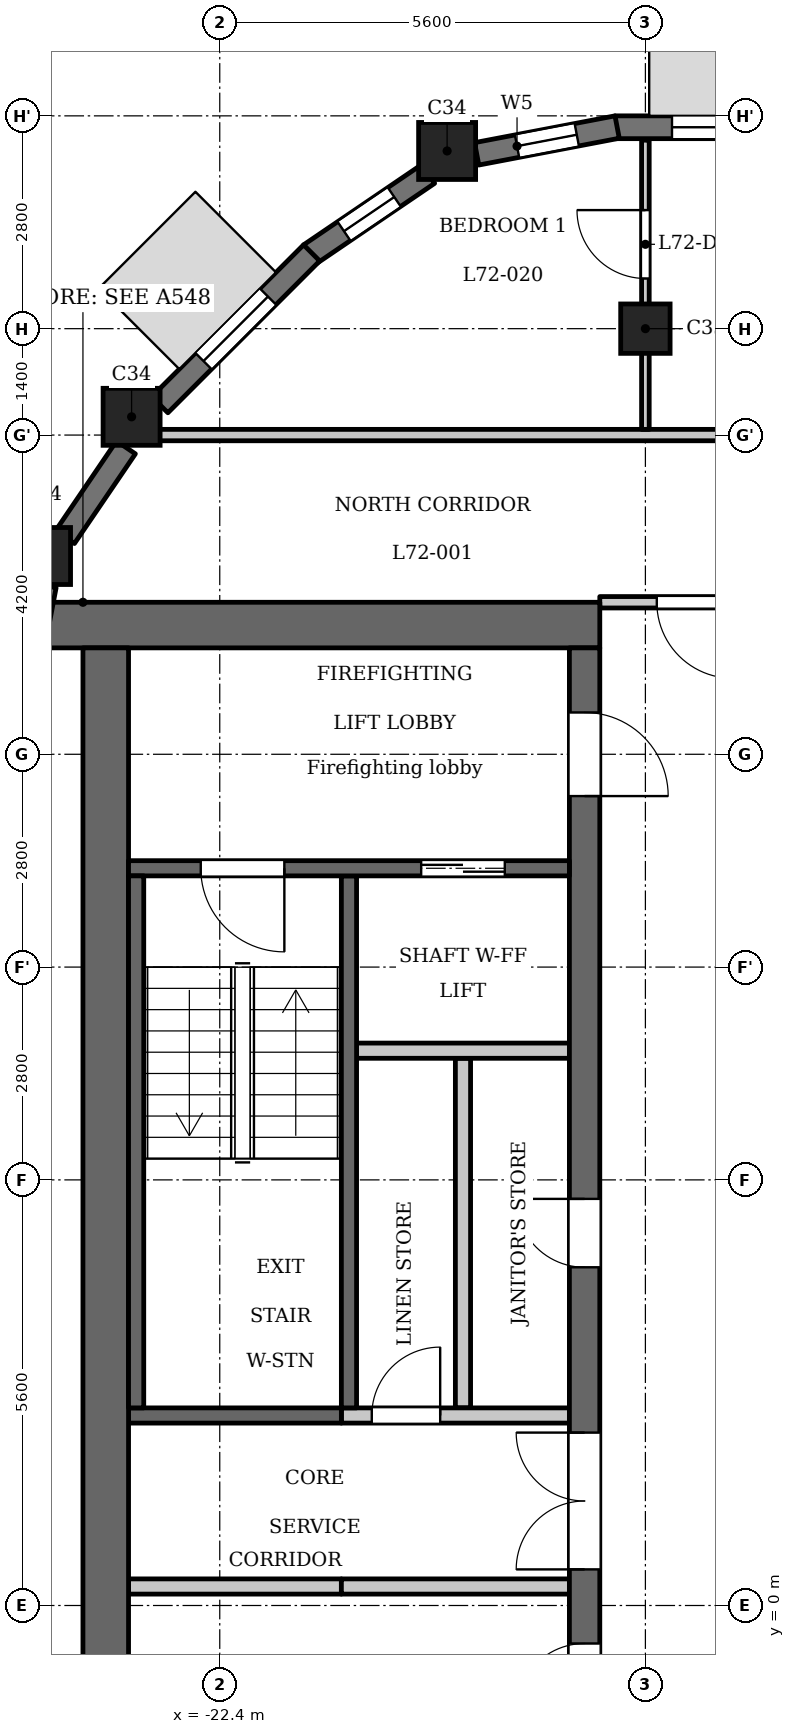
"""IFC4 building model, lengths in metres.
Left out: names, types, materials, properties, quantities, classifications, styles, units other than length and angle.
Written with IfcOpenShell. Run it as: python <this file> out.ifc"""

import sys

from ifc_helpers import new_model, si_unit, direction, frame, frame_2d, origin, origin_2d, place, context, subcontext, project, spatial, rectangle, extrude, element, fill, save


model = new_model("IFC4")
c1 = context("Model", 3, precision=1e-05, world=origin(), true_north=direction((0.0, 1.0)))
c2 = subcontext(c1, "Body", "Model", "MODEL_VIEW")
j1 = project(units=[si_unit("LENGTHUNIT", "METRE"), si_unit("PLANEANGLEUNIT", "RADIAN")], contexts=[c1])
p1 = place(None, origin())
s1 = spatial("IfcSite", under=j1, at=p1, CompositionType="ELEMENT")
p2 = place(p1, origin())
s2 = spatial("IfcBuilding", under=s1, at=p2, CompositionType="ELEMENT")
p3 = place(p2, frame((0.0, 0.0, 276.7)))
s3 = spatial("IfcBuildingStorey", under=s2, at=p3, CompositionType="ELEMENT", Elevation=276.7)
for number, where, z_axis, x_axis in (
    (1, (-19.409, 19.138, 0.0), (0.0, 0.0, 1.0), (1.0, 0.0, 0.0)),
    (2, (-23.56, 15.64, 0.0), (0.0, 0.0, 1.0), (1.0, 0.0, 0.0)),
    (3, (-24.738, 13.809, 0.0), (0.0, 0.0, 1.0), (1.0, 0.0, 0.0)),
):
    element("IfcColumn", number, at=place(p3, frame(where, z_axis=z_axis, x_axis=x_axis)), inside=s3, PredefinedType="COLUMN", context=c2, shape_type="SweptSolid", body=[
        extrude(rectangle(XDim=0.75, YDim=0.75, at=origin_2d()), origin(), (0.0, 0.0, 1.0), 3.5),
    ])
p4 = place(p3, frame((-16.8, 16.8, 0.0), z_axis=(0.0, 0.0, 1.0), x_axis=(1.0, 0.0, 0.0)))
e4 = element("IfcColumn", 4, at=p4, inside=s3, PredefinedType="COLUMN", context=c2, shape_type="SweptSolid", body=[
    extrude(rectangle(XDim=0.65, YDim=0.65, at=origin_2d()), origin(), (0.0, 0.0, 1.0), 3.5),
])
p5 = place(p3, frame((-14.375, 19.45, 0.0), z_axis=(0.0, 0.0, 1.0), x_axis=(-1.0, 0.0, 0.0)))
e5 = element("IfcWall", 5, at=p5, inside=s3, PredefinedType="SOLIDWALL", context=c2, shape_type="SweptSolid", body=[
    extrude(rectangle(XDim=2.825, YDim=0.3, at=frame_2d((1.413, 0.0))), origin(), (0.0, 0.0, 1.0), 2.55),
])
p6 = place(p5, frame((0.275, 0.0, 0.9)))
e6 = element("IfcOpeningElement", 6, at=p6, cuts=e5, PredefinedType="OPENING", context=c2, shape_type="SweptSolid", body=[
    extrude(rectangle(XDim=1.8, YDim=1.25, at=frame_2d((0.9, 0.625))), frame((0.0, 0.16, 0.0), z_axis=(0.0, -1.0, 0.0), x_axis=(1.0, 0.0, 0.0)), (0.0, 0.0, 1.0), 0.32),
])
p7 = place(p3, frame((-17.172, 19.453, 0.0), z_axis=(0.0, 0.0, 1.0), x_axis=(-0.982284001233, -0.187398348234, 0.0)))
e7 = element("IfcWall", 7, at=p7, inside=s3, PredefinedType="SOLIDWALL", context=c2, shape_type="SweptSolid", body=[
    extrude(rectangle(XDim=1.881, YDim=0.3, at=frame_2d((0.941, 0.0))), origin(), (0.0, 0.0, 1.0), 2.55),
])
p8 = place(p7, frame((0.541, 0.0, 0.6)))
e8 = element("IfcOpeningElement", 8, at=p8, cuts=e7, PredefinedType="OPENING", context=c2, shape_type="SweptSolid", body=[
    extrude(rectangle(XDim=0.8, YDim=1.55, at=frame_2d((0.4, 0.775))), frame((0.0, 0.16, 0.0), z_axis=(0.0, -1.0, 0.0), x_axis=(1.0, 0.0, 0.0)), (0.0, 0.0, 1.0), 0.32),
])
p9 = place(p3, frame((-19.657, 18.836, 0.0), z_axis=(0.0, 0.0, 1.0), x_axis=(-0.82704477487, -0.562136051469, 0.0)))
e9 = element("IfcWall", 9, at=p9, inside=s3, PredefinedType="SOLIDWALL", context=c2, shape_type="SweptSolid", body=[
    extrude(rectangle(XDim=1.881, YDim=0.3, at=frame_2d((0.94, 0.0))), origin(), (0.0, 0.0, 1.0), 2.55),
])
p10 = place(p9, frame((0.541, 0.0, 0.6)))
e10 = element("IfcOpeningElement", 10, at=p10, cuts=e9, PredefinedType="OPENING", context=c2, shape_type="SweptSolid", body=[
    extrude(rectangle(XDim=0.8, YDim=1.55, at=frame_2d((0.4, 0.775))), frame((0.0, 0.16, 0.0), z_axis=(0.0, -1.0, 0.0), x_axis=(1.0, 0.0, 0.0)), (0.0, 0.0, 1.0), 0.32),
])
p11 = place(p3, frame((-21.191, 17.797, 0.0), z_axis=(0.0, 0.0, 1.0), x_axis=(-0.707106781187, -0.707106781187, 0.0)))
e11 = element("IfcWall", 11, at=p11, inside=s3, PredefinedType="SOLIDWALL", context=c2, shape_type="SweptSolid", body=[
    extrude(rectangle(XDim=2.825, YDim=0.3, at=frame_2d((1.413, 0.0))), origin(), (0.0, 0.0, 1.0), 2.55),
])
p12 = place(p11, frame((0.812, 0.0, 0.6)))
e12 = element("IfcOpeningElement", 12, at=p12, cuts=e11, PredefinedType="OPENING", context=c2, shape_type="SweptSolid", body=[
    extrude(rectangle(XDim=1.2, YDim=1.55, at=frame_2d((0.6, 0.775))), frame((0.0, 0.16, 0.0), z_axis=(0.0, -1.0, 0.0), x_axis=(1.0, 0.0, 0.0)), (0.0, 0.0, 1.0), 0.32),
])
p13 = place(p3, frame((-23.634, 15.237, 0.0), z_axis=(0.0, 0.0, 1.0), x_axis=(-0.562099454787, -0.827069648173, 0.0)))
e13 = element("IfcWall", 13, at=p13, inside=s3, PredefinedType="SOLIDWALL", context=c2, shape_type="SweptSolid", body=[
    extrude(rectangle(XDim=1.427, YDim=0.3, at=frame_2d((0.714, 0.0))), origin(), (0.0, 0.0, 1.0), 2.55),
])
p14 = place(p3, frame((-24.7, 13.42, 0.0), z_axis=(0.0, 0.0, 1.0), x_axis=(-0.187398348234, -0.982284001233, 0.0)))
e14 = element("IfcWall", 14, at=p14, inside=s3, PredefinedType="SOLIDWALL", context=c2, shape_type="SweptSolid", body=[
    extrude(rectangle(XDim=1.881, YDim=0.3, at=frame_2d((0.941, 0.0))), origin(), (0.0, 0.0, 1.0), 2.55),
])
p15 = place(p3, frame((-20.7, 2.6, 0.0), z_axis=(0.0, 0.0, 1.0), x_axis=(0.0, 1.0, 0.0)))
e15 = element("IfcWall", 15, at=p15, inside=s3, PredefinedType="SHEAR", context=c2, shape_type="SweptSolid", body=[
    extrude(rectangle(XDim=7.0, YDim=0.2, at=frame_2d((3.5, 0.0))), origin(), (0.0, 0.0, 1.0), 3.2),
])
p16 = place(p3, frame((-20.8, 2.5, 0.0), z_axis=(0.0, 0.0, 1.0), x_axis=(-1.0, 0.0, 0.0)))
e16 = element("IfcWall", 16, at=p16, inside=s3, PredefinedType="SHEAR", context=c2, shape_type="SweptSolid", body=[
    extrude(rectangle(XDim=2.8, YDim=0.2, at=frame_2d((1.4, 0.0))), origin(), (0.0, 0.0, 1.0), 3.2),
])
p17 = place(p3, frame((-20.8, 0.25, 0.0), z_axis=(0.0, 0.0, 1.0), x_axis=(-1.0, 0.0, 0.0)))
e17 = element("IfcWall", 17, at=p17, inside=s3, PredefinedType="PARTITIONING", context=c2, shape_type="SweptSolid", body=[
    extrude(rectangle(XDim=2.8, YDim=0.2, at=frame_2d((1.4, 0.0))), origin(), (0.0, 0.0, 1.0), 3.2),
])
p18 = place(p3, frame((-17.4, 12.9, 0.0), z_axis=(0.0, 0.0, 1.0), x_axis=(-1.0, 0.0, 0.0)))
e18 = element("IfcWall", 18, at=p18, inside=s3, PredefinedType="SHEAR", context=c2, shape_type="SweptSolid", body=[
    extrude(rectangle(XDim=7.32, YDim=0.6, at=frame_2d((3.66, 0.0))), origin(), (0.0, 0.0, 1.0), 3.2),
])
p19 = place(p3, frame((-19.2, 2.6, 0.0), z_axis=(0.0, 0.0, 1.0), x_axis=(0.0, 1.0, 0.0)))
e19 = element("IfcWall", 19, at=p19, inside=s3, PredefinedType="PARTITIONING", context=c2, shape_type="SweptSolid", body=[
    extrude(rectangle(XDim=4.6, YDim=0.2, at=frame_2d((2.3, 0.0))), origin(), (0.0, 0.0, 1.0), 3.2),
])
p20 = place(p3, frame((-17.6, -12.6, 0.0), z_axis=(0.0, 0.0, 1.0), x_axis=(0.0, 1.0, 0.0)))
e20 = element("IfcWall", 20, at=p20, inside=s3, PredefinedType="SHEAR", context=c2, shape_type="SweptSolid", body=[
    extrude(rectangle(XDim=25.2, YDim=0.4, at=frame_2d((12.6, 0.0))), origin(), (0.0, 0.0, 1.0), 3.2),
])
p21 = place(p20, frame((6.3, 0.0, 0.0)))
e21 = element("IfcOpeningElement", 21, at=p21, cuts=e20, PredefinedType="OPENING", context=c2, shape_type="SweptSolid", body=[
    extrude(rectangle(XDim=1.1, YDim=2.1, at=frame_2d((0.55, 1.05))), frame((0.0, 0.21, 0.0), z_axis=(0.0, -1.0, 0.0), x_axis=(1.0, 0.0, 0.0)), (0.0, 0.0, 1.0), 0.42),
])
p22 = place(p20, frame((8.7, 0.0, 0.0)))
e22 = element("IfcOpeningElement", 22, at=p22, cuts=e20, PredefinedType="OPENING", context=c2, shape_type="SweptSolid", body=[
    extrude(rectangle(XDim=1.1, YDim=2.1, at=frame_2d((0.55, 1.05))), frame((0.0, 0.21, 0.0), z_axis=(0.0, -1.0, 0.0), x_axis=(1.0, 0.0, 0.0)), (0.0, 0.0, 1.0), 0.42),
])
p23 = place(p20, frame((11.2, 0.0, 0.0)))
e23 = element("IfcOpeningElement", 23, at=p23, cuts=e20, PredefinedType="OPENING", context=c2, shape_type="SweptSolid", body=[
    extrude(rectangle(XDim=0.9, YDim=2.1, at=frame_2d((0.45, 1.05))), frame((0.0, 0.21, 0.0), z_axis=(0.0, -1.0, 0.0), x_axis=(1.0, 0.0, 0.0)), (0.0, 0.0, 1.0), 0.42),
])
p24 = place(p20, frame((17.05, 0.0, 0.0)))
e24 = element("IfcOpeningElement", 24, at=p24, cuts=e20, PredefinedType="OPENING", context=c2, shape_type="SweptSolid", body=[
    extrude(rectangle(XDim=0.9, YDim=2.1, at=frame_2d((0.45, 1.05))), frame((0.0, 0.21, 0.0), z_axis=(0.0, -1.0, 0.0), x_axis=(1.0, 0.0, 0.0)), (0.0, 0.0, 1.0), 0.42),
])
p25 = place(p20, frame((23.25, 0.0, 0.0)))
e25 = element("IfcOpeningElement", 25, at=p25, cuts=e20, PredefinedType="OPENING", context=c2, shape_type="SweptSolid", body=[
    extrude(rectangle(XDim=1.1, YDim=2.1, at=frame_2d((0.55, 1.05))), frame((0.0, 0.21, 0.0), z_axis=(0.0, -1.0, 0.0), x_axis=(1.0, 0.0, 0.0)), (0.0, 0.0, 1.0), 0.42),
])
p26 = place(p20, frame((0.85, 0.0, 0.0)))
e26 = element("IfcOpeningElement", 26, at=p26, cuts=e20, PredefinedType="OPENING", context=c2, shape_type="SweptSolid", body=[
    extrude(rectangle(XDim=1.1, YDim=2.1, at=frame_2d((0.55, 1.05))), frame((0.0, 0.21, 0.0), z_axis=(0.0, -1.0, 0.0), x_axis=(1.0, 0.0, 0.0)), (0.0, 0.0, 1.0), 0.42),
])
p27 = place(p20, frame((13.075, 0.0, 0.0)))
e27 = element("IfcOpeningElement", 27, at=p27, cuts=e20, PredefinedType="OPENING", context=c2, shape_type="SweptSolid", body=[
    extrude(rectangle(XDim=1.8, YDim=2.1, at=frame_2d((0.9, 1.05))), frame((0.0, 0.21, 0.0), z_axis=(0.0, -1.0, 0.0), x_axis=(1.0, 0.0, 0.0)), (0.0, 0.0, 1.0), 0.42),
])
p28 = place(p3, frame((-23.9, -12.6, 0.0), z_axis=(0.0, 0.0, 1.0), x_axis=(0.0, 1.0, 0.0)))
e28 = element("IfcWall", 28, at=p28, inside=s3, PredefinedType="SHEAR", context=c2, shape_type="SweptSolid", body=[
    extrude(rectangle(XDim=25.2, YDim=0.6, at=frame_2d((12.6, 0.0))), origin(), (0.0, 0.0, 1.0), 3.2),
])
p29 = place(p3, frame((-17.8, 0.25, 0.0), z_axis=(0.0, 0.0, 1.0), x_axis=(-1.0, 0.0, 0.0)))
e29 = element("IfcWall", 29, at=p29, inside=s3, PredefinedType="PARTITIONING", context=c2, shape_type="SweptSolid", body=[
    extrude(rectangle(XDim=3.0, YDim=0.2, at=frame_2d((1.5, 0.0))), origin(), (0.0, 0.0, 1.0), 3.2),
])
p30 = place(p3, frame((-17.8, 2.5, 0.0), z_axis=(0.0, 0.0, 1.0), x_axis=(-1.0, 0.0, 0.0)))
e30 = element("IfcWall", 30, at=p30, inside=s3, PredefinedType="PARTITIONING", context=c2, shape_type="SweptSolid", body=[
    extrude(rectangle(XDim=3.0, YDim=0.2, at=frame_2d((1.5, 0.0))), origin(), (0.0, 0.0, 1.0), 3.2),
])
p31 = place(p30, frame((1.7, 0.0, 0.0)))
e31 = element("IfcOpeningElement", 31, at=p31, cuts=e30, PredefinedType="OPENING", context=c2, shape_type="SweptSolid", body=[
    extrude(rectangle(XDim=0.9, YDim=2.1, at=frame_2d((0.45, 1.05))), frame((0.0, 0.11, 0.0), z_axis=(0.0, -1.0, 0.0), x_axis=(1.0, 0.0, 0.0)), (0.0, 0.0, 1.0), 0.22),
])
p32 = place(p3, frame((-17.8, 7.3, 0.0), z_axis=(0.0, 0.0, 1.0), x_axis=(-1.0, 0.0, 0.0)))
e32 = element("IfcWall", 32, at=p32, inside=s3, PredefinedType="PARTITIONING", context=c2, shape_type="SweptSolid", body=[
    extrude(rectangle(XDim=2.8, YDim=0.2, at=frame_2d((1.4, 0.0))), origin(), (0.0, 0.0, 1.0), 3.2),
])
p33 = place(p3, frame((-17.8, 9.7, 0.0), z_axis=(0.0, 0.0, 1.0), x_axis=(-1.0, 0.0, 0.0)))
e33 = element("IfcWall", 33, at=p33, inside=s3, PredefinedType="SHEAR", context=c2, shape_type="SweptSolid", body=[
    extrude(rectangle(XDim=5.8, YDim=0.2, at=frame_2d((2.9, 0.0))), origin(), (0.0, 0.0, 1.0), 3.2),
])
p34 = place(p33, frame((0.85, 0.0, 0.0)))
e34 = element("IfcOpeningElement", 34, at=p34, cuts=e33, PredefinedType="OPENING", context=c2, shape_type="SweptSolid", body=[
    extrude(rectangle(XDim=1.1, YDim=2.1, at=frame_2d((0.55, 1.05))), frame((0.0, 0.11, 0.0), z_axis=(0.0, -1.0, 0.0), x_axis=(1.0, 0.0, 0.0)), (0.0, 0.0, 1.0), 0.22),
])
p35 = place(p33, frame((3.75, 0.0, 0.0)))
e35 = element("IfcOpeningElement", 35, at=p35, cuts=e33, PredefinedType="OPENING", context=c2, shape_type="SweptSolid", body=[
    extrude(rectangle(XDim=1.1, YDim=2.1, at=frame_2d((0.55, 1.05))), frame((0.0, 0.11, 0.0), z_axis=(0.0, -1.0, 0.0), x_axis=(1.0, 0.0, 0.0)), (0.0, 0.0, 1.0), 0.22),
])
p36 = place(p3, frame((-23.5, 2.6, 0.0), z_axis=(0.0, 0.0, 1.0), x_axis=(0.0, 1.0, 0.0)))
e36 = element("IfcWall", 36, at=p36, inside=s3, PredefinedType="SHEAR", context=c2, shape_type="SweptSolid", body=[
    extrude(rectangle(XDim=7.0, YDim=0.2, at=frame_2d((3.5, 0.0))), origin(), (0.0, 0.0, 1.0), 3.2),
])
p37 = place(p3, frame((-17.4, 13.2, 0.0), z_axis=(0.0, 0.0, 1.0), x_axis=(1.0, 0.0, 0.0)))
e37 = element("IfcWall", 37, at=p37, inside=s3, PredefinedType="PARTITIONING", context=c2, shape_type="SweptSolid", body=[
    extrude(rectangle(XDim=2.325, YDim=0.15, at=frame_2d((1.163, 0.0))), origin(), (0.0, 0.0, 1.0), 3.2),
])
p38 = place(p37, frame((0.75, 0.0, 0.0)))
e38 = element("IfcOpeningElement", 38, at=p38, cuts=e37, PredefinedType="OPENING", context=c2, shape_type="SweptSolid", body=[
    extrude(rectangle(XDim=1.0, YDim=2.1, at=frame_2d((0.5, 1.05))), frame((0.0, 0.085, 0.0), z_axis=(0.0, -1.0, 0.0), x_axis=(1.0, 0.0, 0.0)), (0.0, 0.0, 1.0), 0.17),
])
p39 = place(p3, frame((-23.55, 15.4, 0.0), z_axis=(0.0, 0.0, 1.0), x_axis=(1.0, 0.0, 0.0)))
e39 = element("IfcWall", 39, at=p39, inside=s3, PredefinedType="PARTITIONING", context=c2, shape_type="SweptSolid", body=[
    extrude(rectangle(XDim=46.872, YDim=0.15, at=frame_2d((23.436, 0.0))), origin(), (0.0, 0.0, 1.0), 3.2),
])
p40 = place(p39, frame((13.9, 0.0, 0.0)))
e40 = element("IfcOpeningElement", 40, at=p40, cuts=e39, PredefinedType="OPENING", context=c2, shape_type="SweptSolid", body=[
    extrude(rectangle(XDim=1.0, YDim=2.1, at=frame_2d((0.5, 1.05))), frame((0.0, 0.085, 0.0), z_axis=(0.0, -1.0, 0.0), x_axis=(1.0, 0.0, 0.0)), (0.0, 0.0, 1.0), 0.17),
])
p41 = place(p39, frame((21.9, 0.0, 0.0)))
e41 = element("IfcOpeningElement", 41, at=p41, cuts=e39, PredefinedType="OPENING", context=c2, shape_type="SweptSolid", body=[
    extrude(rectangle(XDim=1.0, YDim=2.1, at=frame_2d((0.5, 1.05))), frame((0.0, 0.085, 0.0), z_axis=(0.0, -1.0, 0.0), x_axis=(1.0, 0.0, 0.0)), (0.0, 0.0, 1.0), 0.17),
])
p42 = place(p39, frame((38.7, 0.0, 0.0)))
e42 = element("IfcOpeningElement", 42, at=p42, cuts=e39, PredefinedType="OPENING", context=c2, shape_type="SweptSolid", body=[
    extrude(rectangle(XDim=1.0, YDim=2.1, at=frame_2d((0.5, 1.05))), frame((0.0, 0.085, 0.0), z_axis=(0.0, -1.0, 0.0), x_axis=(1.0, 0.0, 0.0)), (0.0, 0.0, 1.0), 0.17),
])
p43 = place(p3, frame((-16.8, 15.475, 0.0), z_axis=(0.0, 0.0, 1.0), x_axis=(0.0, 1.0, 0.0)))
e43 = element("IfcWall", 43, at=p43, inside=s3, PredefinedType="PARTITIONING", context=c2, shape_type="SweptSolid", body=[
    extrude(rectangle(XDim=3.805, YDim=0.1, at=frame_2d((1.902, 0.0))), origin(), (0.0, 0.0, 1.0), 3.2),
])
p44 = place(p43, frame((1.985, 0.0, 0.0)))
e44 = element("IfcOpeningElement", 44, at=p44, cuts=e43, PredefinedType="OPENING", context=c2, shape_type="SweptSolid", body=[
    extrude(rectangle(XDim=0.9, YDim=2.1, at=frame_2d((0.45, 1.05))), frame((0.0, 0.06, 0.0), z_axis=(0.0, -1.0, 0.0), x_axis=(1.0, 0.0, 0.0)), (0.0, 0.0, 1.0), 0.12),
])
p45 = place(p23, origin())
e45 = element("IfcDoor", 45, at=p45, inside=s3, OperationType="SINGLE_SWING_RIGHT", PredefinedType="DOOR", context=c2, shape_type="SweptSolid", body=[
    extrude(rectangle(XDim=0.9, YDim=2.1, at=frame_2d((0.45, 1.05))), frame((0.0, 0.025, 0.0), z_axis=(0.0, -1.0, 0.0), x_axis=(1.0, 0.0, 0.0)), (0.0, 0.0, 1.0), 0.05),
])
fill(e23, e45)
p46 = place(p24, origin())
e46 = element("IfcDoor", 46, at=p46, inside=s3, OperationType="SINGLE_SWING_LEFT", PredefinedType="DOOR", context=c2, shape_type="SweptSolid", body=[
    extrude(rectangle(XDim=0.9, YDim=2.1, at=frame_2d((0.45, 1.05))), frame((0.0, 0.025, 0.0), z_axis=(0.0, -1.0, 0.0), x_axis=(1.0, 0.0, 0.0)), (0.0, 0.0, 1.0), 0.05),
])
fill(e24, e46)
p47 = place(p31, origin())
e47 = element("IfcDoor", 47, at=p47, inside=s3, OperationType="SINGLE_SWING_LEFT", PredefinedType="DOOR", context=c2, shape_type="SweptSolid", body=[
    extrude(rectangle(XDim=0.9, YDim=2.1, at=frame_2d((0.45, 1.05))), frame((0.0, 0.025, 0.0), z_axis=(0.0, -1.0, 0.0), x_axis=(1.0, 0.0, 0.0)), (0.0, 0.0, 1.0), 0.05),
])
fill(e31, e47)
p48 = place(p34, origin())
e48 = element("IfcDoor", 48, at=p48, inside=s3, OperationType="DOUBLE_DOOR_SLIDING", PredefinedType="DOOR", context=c2, shape_type="SweptSolid", body=[
    extrude(rectangle(XDim=1.1, YDim=2.1, at=frame_2d((0.55, 1.05))), frame((0.0, 0.025, 0.0), z_axis=(0.0, -1.0, 0.0), x_axis=(1.0, 0.0, 0.0)), (0.0, 0.0, 1.0), 0.05),
])
fill(e34, e48)
p49 = place(p25, origin())
e49 = element("IfcDoor", 49, at=p49, inside=s3, OperationType="SINGLE_SWING_LEFT", PredefinedType="DOOR", context=c2, shape_type="SweptSolid", body=[
    extrude(rectangle(XDim=1.1, YDim=2.1, at=frame_2d((0.55, 1.05))), frame((0.0, 0.025, 0.0), z_axis=(0.0, -1.0, 0.0), x_axis=(1.0, 0.0, 0.0)), (0.0, 0.0, 1.0), 0.05),
])
fill(e25, e49)
p50 = place(p35, origin())
e50 = element("IfcDoor", 50, at=p50, inside=s3, OperationType="SINGLE_SWING_RIGHT", PredefinedType="DOOR", context=c2, shape_type="SweptSolid", body=[
    extrude(rectangle(XDim=1.1, YDim=2.1, at=frame_2d((0.55, 1.05))), frame((0.0, 0.025, 0.0), z_axis=(0.0, -1.0, 0.0), x_axis=(1.0, 0.0, 0.0)), (0.0, 0.0, 1.0), 0.05),
])
fill(e35, e50)
p51 = place(p27, origin())
e51 = element("IfcDoor", 51, at=p51, inside=s3, OperationType="DOUBLE_DOOR_SINGLE_SWING", PredefinedType="DOOR", context=c2, shape_type="SweptSolid", body=[
    extrude(rectangle(XDim=1.8, YDim=2.1, at=frame_2d((0.9, 1.05))), frame((0.0, 0.025, 0.0), z_axis=(0.0, -1.0, 0.0), x_axis=(1.0, 0.0, 0.0)), (0.0, 0.0, 1.0), 0.05),
])
fill(e27, e51)
p52 = place(p38, origin())
e52 = element("IfcDoor", 52, at=p52, inside=s3, OperationType="SINGLE_SWING_RIGHT", PredefinedType="DOOR", context=c2, shape_type="SweptSolid", body=[
    extrude(rectangle(XDim=1.0, YDim=2.1, at=frame_2d((0.5, 1.05))), frame((0.0, 0.025, 0.0), z_axis=(0.0, -1.0, 0.0), x_axis=(1.0, 0.0, 0.0)), (0.0, 0.0, 1.0), 0.05),
])
fill(e38, e52)
p53 = place(p44, origin())
e53 = element("IfcDoor", 53, at=p53, inside=s3, OperationType="SINGLE_SWING_LEFT", PredefinedType="DOOR", context=c2, shape_type="SweptSolid", body=[
    extrude(rectangle(XDim=0.9, YDim=2.1, at=frame_2d((0.45, 1.05))), frame((0.0, 0.025, 0.0), z_axis=(0.0, -1.0, 0.0), x_axis=(1.0, 0.0, 0.0)), (0.0, 0.0, 1.0), 0.05),
])
fill(e44, e53)
p54 = place(p6, origin())
e54 = element("IfcWindow", 54, at=p54, inside=s3, PartitioningType="SINGLE_PANEL", PredefinedType="WINDOW", context=c2, shape_type="SweptSolid", body=[
    extrude(rectangle(XDim=1.8, YDim=1.25, at=frame_2d((0.9, 0.625))), frame((0.0, 0.03, 0.0), z_axis=(0.0, -1.0, 0.0), x_axis=(1.0, 0.0, 0.0)), (0.0, 0.0, 1.0), 0.06),
])
fill(e6, e54)
p55 = place(p8, origin())
e55 = element("IfcWindow", 55, at=p55, inside=s3, PartitioningType="SINGLE_PANEL", PredefinedType="WINDOW", context=c2, shape_type="SweptSolid", body=[
    extrude(rectangle(XDim=0.8, YDim=1.55, at=frame_2d((0.4, 0.775))), frame((0.0, 0.03, 0.0), z_axis=(0.0, -1.0, 0.0), x_axis=(1.0, 0.0, 0.0)), (0.0, 0.0, 1.0), 0.06),
])
fill(e8, e55)
p56 = place(p10, origin())
e56 = element("IfcWindow", 56, at=p56, inside=s3, PartitioningType="SINGLE_PANEL", PredefinedType="WINDOW", context=c2, shape_type="SweptSolid", body=[
    extrude(rectangle(XDim=0.8, YDim=1.55, at=frame_2d((0.4, 0.775))), frame((0.0, 0.03, 0.0), z_axis=(0.0, -1.0, 0.0), x_axis=(1.0, 0.0, 0.0)), (0.0, 0.0, 1.0), 0.06),
])
fill(e10, e56)
p57 = place(p12, origin())
e57 = element("IfcWindow", 57, at=p57, inside=s3, PartitioningType="SINGLE_PANEL", PredefinedType="WINDOW", context=c2, shape_type="SweptSolid", body=[
    extrude(rectangle(XDim=1.2, YDim=1.55, at=frame_2d((0.6, 0.775))), frame((0.0, 0.03, 0.0), z_axis=(0.0, -1.0, 0.0), x_axis=(1.0, 0.0, 0.0)), (0.0, 0.0, 1.0), 0.06),
])
fill(e12, e57)
save(model, sys.argv[1])
